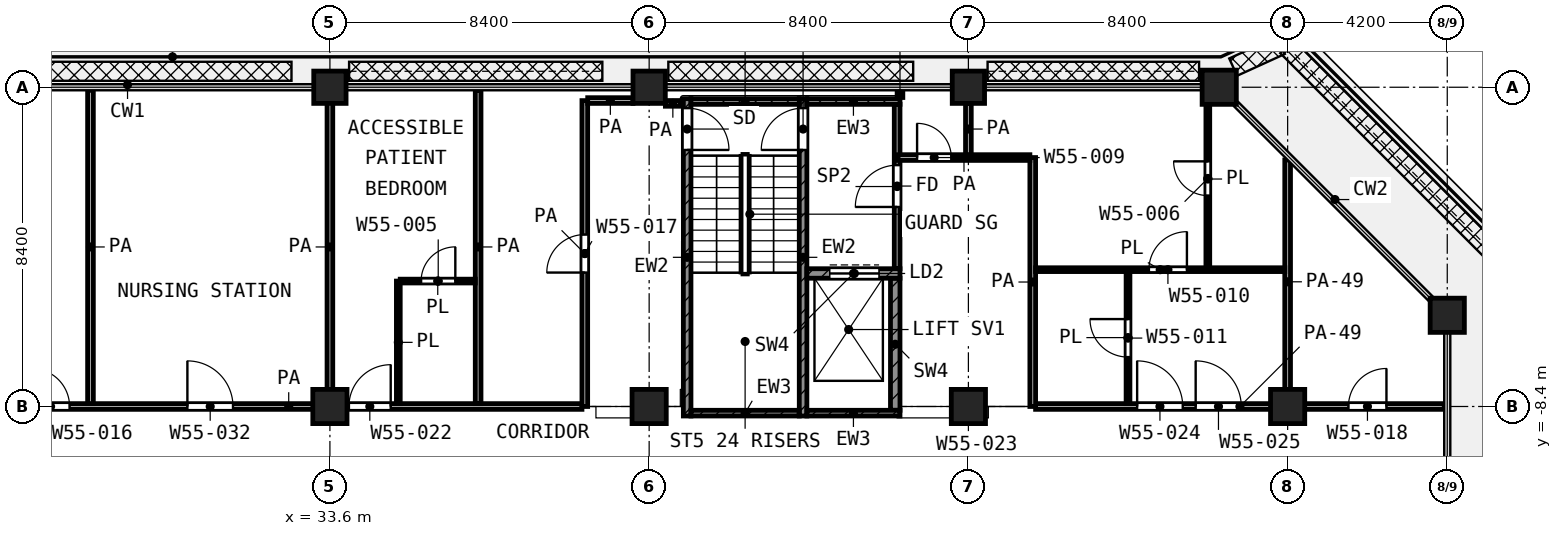
"""IFC4 building model, lengths in metres.
Left out: names, types, materials, properties, quantities, classifications, styles, units other than length and angle.
Written with IfcOpenShell. Run it as: python <this file> out.ifc"""

import sys

from ifc_helpers import new_model, si_unit, direction, frame, frame_2d, origin, origin_2d, place, context, subcontext, project, spatial, rectangle, extrude, element, fill, save


model = new_model("IFC4")
c1 = context("Model", 3, precision=1e-05, world=origin(), true_north=direction((0.0, 1.0)))
c2 = subcontext(c1, "Body", "Model", "MODEL_VIEW")
j1 = project(units=[si_unit("LENGTHUNIT", "METRE"), si_unit("PLANEANGLEUNIT", "RADIAN")], contexts=[c1])
p1 = place(None, origin())
s1 = spatial("IfcSite", under=j1, at=p1, CompositionType="ELEMENT")
p2 = place(p1, origin())
s2 = spatial("IfcBuilding", under=s1, at=p2, CompositionType="ELEMENT")
p3 = place(p2, frame((0.0, 0.0, 260.0)))
s3 = spatial("IfcBuildingStorey", under=s2, at=p3, CompositionType="ELEMENT", Elevation=260.0)
for number, where, z_axis, x_axis in (
    (1, (33.6, 0.0, 0.0), (0.0, 0.0, 1.0), (1.0, 0.0, 0.0)),
    (2, (42.0, 0.0, 0.0), (0.0, 0.0, 1.0), (1.0, 0.0, 0.0)),
    (3, (50.4, 0.0, 0.0), (0.0, 0.0, 1.0), (1.0, 0.0, 0.0)),
):
    element("IfcColumn", number, at=place(p3, frame(where, z_axis=z_axis, x_axis=x_axis)), inside=s3, PredefinedType="COLUMN", context=c2, shape_type="SweptSolid", body=[
        extrude(rectangle(XDim=0.85, YDim=0.85, at=origin_2d()), origin(), (0.0, 0.0, 1.0), 4.2),
    ])
for number, where, z_axis, x_axis in (
    (4, (57.0, 0.0, 0.0), (0.0, 0.0, 1.0), (1.0, 0.0, 0.0)),
    (5, (63.0, -6.0, 0.0), (0.0, 0.0, 1.0), (1.0, 0.0, 0.0)),
    (6, (33.6, -8.4, 0.0), (0.0, 0.0, 1.0), (1.0, 0.0, 0.0)),
    (7, (42.0, -8.4, 0.0), (0.0, 0.0, 1.0), (1.0, 0.0, 0.0)),
    (8, (50.4, -8.4, 0.0), (0.0, 0.0, 1.0), (1.0, 0.0, 0.0)),
    (9, (58.8, -8.4, 0.0), (0.0, 0.0, 1.0), (1.0, 0.0, 0.0)),
):
    element("IfcColumn", number, at=place(p3, frame(where, z_axis=z_axis, x_axis=x_axis)), inside=s3, PredefinedType="COLUMN", context=c2, shape_type="SweptSolid", body=[
        extrude(rectangle(XDim=0.9, YDim=0.9, at=origin_2d()), origin(), (0.0, 0.0, 1.0), 4.2),
    ])
p4 = place(p3, frame((43.0, -8.65, 0.0), z_axis=(0.0, 0.0, 1.0), x_axis=(0.0, 1.0, 0.0)))
e10 = element("IfcWall", 10, at=p4, inside=s3, PredefinedType="SHEAR", context=c2, shape_type="SweptSolid", body=[
    extrude(rectangle(XDim=8.35, YDim=0.2, at=frame_2d((4.175, 0.0))), origin(), (0.0, 0.0, 1.0), 3.6),
])
p5 = place(p4, frame((7.0, 0.0, 0.0)))
e11 = element("IfcOpeningElement", 11, at=p5, cuts=e10, PredefinedType="OPENING", context=c2, shape_type="SweptSolid", body=[
    extrude(rectangle(XDim=1.1, YDim=2.1, at=frame_2d((0.55, 1.05))), frame((0.0, 0.11, 0.0), z_axis=(0.0, -1.0, 0.0), x_axis=(1.0, 0.0, 0.0)), (0.0, 0.0, 1.0), 0.22),
])
p6 = place(p3, frame((46.05, -8.65, 0.0), z_axis=(0.0, 0.0, 1.0), x_axis=(0.0, 1.0, 0.0)))
e12 = element("IfcWall", 12, at=p6, inside=s3, PredefinedType="SHEAR", context=c2, shape_type="SweptSolid", body=[
    extrude(rectangle(XDim=8.35, YDim=0.2, at=frame_2d((4.175, 0.0))), origin(), (0.0, 0.0, 1.0), 3.6),
])
p7 = place(p6, frame((7.0, 0.0, 0.0)))
e13 = element("IfcOpeningElement", 13, at=p7, cuts=e12, PredefinedType="OPENING", context=c2, shape_type="SweptSolid", body=[
    extrude(rectangle(XDim=1.1, YDim=2.1, at=frame_2d((0.55, 1.05))), frame((0.0, 0.11, 0.0), z_axis=(0.0, -1.0, 0.0), x_axis=(1.0, 0.0, 0.0)), (0.0, 0.0, 1.0), 0.22),
])
p8 = place(p3, frame((43.1, -0.375, 0.0), z_axis=(0.0, 0.0, 1.0), x_axis=(1.0, 0.0, 0.0)))
e14 = element("IfcWall", 14, at=p8, inside=s3, PredefinedType="SHEAR", context=c2, shape_type="SweptSolid", body=[
    extrude(rectangle(XDim=2.85, YDim=0.15, at=frame_2d((1.425, 0.0))), origin(), (0.0, 0.0, 1.0), 3.6),
])
p9 = place(p3, frame((46.15, -0.375, 0.0), z_axis=(0.0, 0.0, 1.0), x_axis=(1.0, 0.0, 0.0)))
e15 = element("IfcWall", 15, at=p9, inside=s3, PredefinedType="SHEAR", context=c2, shape_type="SweptSolid", body=[
    extrude(rectangle(XDim=2.45, YDim=0.15, at=frame_2d((1.225, 0.0))), origin(), (0.0, 0.0, 1.0), 3.6),
])
p10 = place(p3, frame((43.1, -8.575, 0.0), z_axis=(0.0, 0.0, 1.0), x_axis=(1.0, 0.0, 0.0)))
e16 = element("IfcWall", 16, at=p10, inside=s3, PredefinedType="SHEAR", context=c2, shape_type="SweptSolid", body=[
    extrude(rectangle(XDim=2.85, YDim=0.15, at=frame_2d((1.425, 0.0))), origin(), (0.0, 0.0, 1.0), 3.6),
])
p11 = place(p3, frame((46.15, -8.575, 0.0), z_axis=(0.0, 0.0, 1.0), x_axis=(1.0, 0.0, 0.0)))
e17 = element("IfcWall", 17, at=p11, inside=s3, PredefinedType="SHEAR", context=c2, shape_type="SweptSolid", body=[
    extrude(rectangle(XDim=2.45, YDim=0.15, at=frame_2d((1.225, 0.0))), origin(), (0.0, 0.0, 1.0), 3.6),
])
p12 = place(p3, frame((46.15, -4.9, 0.0), z_axis=(0.0, 0.0, 1.0), x_axis=(1.0, 0.0, 0.0)))
e18 = element("IfcWall", 18, at=p12, inside=s3, PredefinedType="SHEAR", context=c2, shape_type="SweptSolid", body=[
    extrude(rectangle(XDim=2.45, YDim=0.25, at=frame_2d((1.225, 0.0))), origin(), (0.0, 0.0, 1.0), 3.6),
])
p13 = place(p12, frame((0.6, 0.0, 0.0)))
e19 = element("IfcOpeningElement", 19, at=p13, cuts=e18, PredefinedType="OPENING", context=c2, shape_type="SweptSolid", body=[
    extrude(rectangle(XDim=1.3, YDim=2.1, at=frame_2d((0.65, 1.05))), frame((0.0, 0.135, 0.0), z_axis=(0.0, -1.0, 0.0), x_axis=(1.0, 0.0, 0.0)), (0.0, 0.0, 1.0), 0.27),
])
p14 = place(p3, frame((48.475, -8.5, 0.0), z_axis=(0.0, 0.0, 1.0), x_axis=(0.0, 1.0, 0.0)))
e20 = element("IfcWall", 20, at=p14, inside=s3, PredefinedType="SHEAR", context=c2, shape_type="SweptSolid", body=[
    extrude(rectangle(XDim=3.475, YDim=0.25, at=frame_2d((1.738, 0.0))), origin(), (0.0, 0.0, 1.0), 3.6),
])
p15 = place(p3, frame((48.525, -4.775, 0.0), z_axis=(0.0, 0.0, 1.0), x_axis=(0.0, 1.0, 0.0)))
e21 = element("IfcWall", 21, at=p15, inside=s3, PredefinedType="PARTITIONING", context=c2, shape_type="SweptSolid", body=[
    extrude(rectangle(XDim=4.325, YDim=0.15, at=frame_2d((2.163, 0.0))), origin(), (0.0, 0.0, 1.0), 3.6),
])
p16 = place(p15, frame((1.625, 0.0, 0.0)))
e22 = element("IfcOpeningElement", 22, at=p16, cuts=e21, PredefinedType="OPENING", context=c2, shape_type="SweptSolid", body=[
    extrude(rectangle(XDim=1.1, YDim=2.1, at=frame_2d((0.55, 1.05))), frame((0.0, 0.085, 0.0), z_axis=(0.0, -1.0, 0.0), x_axis=(1.0, 0.0, 0.0)), (0.0, 0.0, 1.0), 0.17),
])
p17 = place(p3, frame((35.45, -5.1, 0.0), z_axis=(0.0, 0.0, 1.0), x_axis=(1.0, 0.0, 0.0)))
e23 = element("IfcWall", 23, at=p17, inside=s3, PredefinedType="PARTITIONING", context=c2, shape_type="SweptSolid", body=[
    extrude(rectangle(XDim=1.975, YDim=0.1, at=frame_2d((0.988, 0.0))), origin(), (0.0, 0.0, 1.0), 3.6),
])
p18 = place(p17, frame((0.55, 0.0, 0.0)))
e24 = element("IfcOpeningElement", 24, at=p18, cuts=e23, PredefinedType="OPENING", context=c2, shape_type="SweptSolid", body=[
    extrude(rectangle(XDim=0.9, YDim=2.1, at=frame_2d((0.45, 1.05))), frame((0.0, 0.06, 0.0), z_axis=(0.0, -1.0, 0.0), x_axis=(1.0, 0.0, 0.0)), (0.0, 0.0, 1.0), 0.12),
])
p19 = place(p3, frame((52.168, -4.8, 0.0), z_axis=(0.0, 0.0, 1.0), x_axis=(1.0, 0.0, 0.0)))
e25 = element("IfcWall", 25, at=p19, inside=s3, PredefinedType="PARTITIONING", context=c2, shape_type="SweptSolid", body=[
    extrude(rectangle(XDim=6.557, YDim=0.1, at=frame_2d((3.279, 0.0))), origin(), (0.0, 0.0, 1.0), 3.6),
])
p20 = place(p19, frame((2.982, 0.0, 0.0)))
e26 = element("IfcOpeningElement", 26, at=p20, cuts=e25, PredefinedType="OPENING", context=c2, shape_type="SweptSolid", body=[
    extrude(rectangle(XDim=1.0, YDim=2.1, at=frame_2d((0.5, 1.05))), frame((0.0, 0.06, 0.0), z_axis=(0.0, -1.0, 0.0), x_axis=(1.0, 0.0, 0.0)), (0.0, 0.0, 1.0), 0.12),
])
p21 = place(p3, frame((35.4, -8.325, 0.0), z_axis=(0.0, 0.0, 1.0), x_axis=(0.0, 1.0, 0.0)))
e27 = element("IfcWall", 27, at=p21, inside=s3, PredefinedType="PARTITIONING", context=c2, shape_type="SweptSolid", body=[
    extrude(rectangle(XDim=3.225, YDim=0.1, at=frame_2d((1.612, 0.0))), origin(), (0.0, 0.0, 1.0), 3.6),
])
p22 = place(p3, frame((54.6, -8.325, 0.0), z_axis=(0.0, 0.0, 1.0), x_axis=(0.0, 1.0, 0.0)))
e28 = element("IfcWall", 28, at=p22, inside=s3, PredefinedType="PARTITIONING", context=c2, shape_type="SweptSolid", body=[
    extrude(rectangle(XDim=3.475, YDim=0.1, at=frame_2d((1.737, 0.0))), origin(), (0.0, 0.0, 1.0), 3.6),
])
p23 = place(p22, frame((1.225, 0.0, 0.0)))
e29 = element("IfcOpeningElement", 29, at=p23, cuts=e28, PredefinedType="OPENING", context=c2, shape_type="SweptSolid", body=[
    extrude(rectangle(XDim=1.0, YDim=2.1, at=frame_2d((0.5, 1.05))), frame((0.0, 0.06, 0.0), z_axis=(0.0, -1.0, 0.0), x_axis=(1.0, 0.0, 0.0)), (0.0, 0.0, 1.0), 0.12),
])
p24 = place(p3, frame((56.7, -4.75, 0.0), z_axis=(0.0, 0.0, 1.0), x_axis=(0.0, 1.0, 0.0)))
e30 = element("IfcWall", 30, at=p24, inside=s3, PredefinedType="PARTITIONING", context=c2, shape_type="SweptSolid", body=[
    extrude(rectangle(XDim=4.67, YDim=0.1, at=frame_2d((2.335, 0.0))), origin(), (0.0, 0.0, 1.0), 3.6),
])
p25 = place(p24, frame((1.9, 0.0, 0.0)))
e31 = element("IfcOpeningElement", 31, at=p25, cuts=e30, PredefinedType="OPENING", context=c2, shape_type="SweptSolid", body=[
    extrude(rectangle(XDim=0.9, YDim=2.1, at=frame_2d((0.45, 1.05))), frame((0.0, 0.06, 0.0), z_axis=(0.0, -1.0, 0.0), x_axis=(1.0, 0.0, 0.0)), (0.0, 0.0, 1.0), 0.12),
])
p26 = place(p3, frame((24.8, -8.4, 0.0), z_axis=(0.0, 0.0, 1.0), x_axis=(1.0, 0.0, 0.0)))
e32 = element("IfcWall", 32, at=p26, inside=s3, PredefinedType="PARTITIONING", context=c2, shape_type="SweptSolid", body=[
    extrude(rectangle(XDim=15.432, YDim=0.15, at=frame_2d((7.716, 0.0))), origin(), (0.0, 0.0, 1.0), 3.6),
])
p27 = place(p26, frame((9.3, 0.0, 0.0)))
e33 = element("IfcOpeningElement", 33, at=p27, cuts=e32, PredefinedType="OPENING", context=c2, shape_type="SweptSolid", body=[
    extrude(rectangle(XDim=1.1, YDim=2.1, at=frame_2d((0.55, 1.05))), frame((0.0, 0.085, 0.0), z_axis=(0.0, -1.0, 0.0), x_axis=(1.0, 0.0, 0.0)), (0.0, 0.0, 1.0), 0.17),
])
p28 = place(p26, frame((0.95, 0.0, 0.0)))
e34 = element("IfcOpeningElement", 34, at=p28, cuts=e32, PredefinedType="OPENING", context=c2, shape_type="SweptSolid", body=[
    extrude(rectangle(XDim=1.0, YDim=2.1, at=frame_2d((0.5, 1.05))), frame((0.0, 0.085, 0.0), z_axis=(0.0, -1.0, 0.0), x_axis=(1.0, 0.0, 0.0)), (0.0, 0.0, 1.0), 0.17),
])
p29 = place(p26, frame((5.05, 0.0, 0.0)))
e35 = element("IfcOpeningElement", 35, at=p29, cuts=e32, PredefinedType="OPENING", context=c2, shape_type="SweptSolid", body=[
    extrude(rectangle(XDim=1.2, YDim=2.1, at=frame_2d((0.6, 1.05))), frame((0.0, 0.085, 0.0), z_axis=(0.0, -1.0, 0.0), x_axis=(1.0, 0.0, 0.0)), (0.0, 0.0, 1.0), 0.17),
])
p30 = place(p3, frame((52.168, -8.4, 0.0), z_axis=(0.0, 0.0, 1.0), x_axis=(1.0, 0.0, 0.0)))
e36 = element("IfcWall", 36, at=p30, inside=s3, PredefinedType="PARTITIONING", context=c2, shape_type="SweptSolid", body=[
    extrude(rectangle(XDim=10.752, YDim=0.15, at=frame_2d((5.376, 0.0))), origin(), (0.0, 0.0, 1.0), 2.7),
])
p31 = place(p30, frame((2.672, 0.0, 0.0)))
e37 = element("IfcOpeningElement", 37, at=p31, cuts=e36, PredefinedType="OPENING", context=c2, shape_type="SweptSolid", body=[
    extrude(rectangle(XDim=1.2, YDim=2.1, at=frame_2d((0.6, 1.05))), frame((0.0, 0.085, 0.0), z_axis=(0.0, -1.0, 0.0), x_axis=(1.0, 0.0, 0.0)), (0.0, 0.0, 1.0), 0.17),
])
p32 = place(p30, frame((4.212, 0.0, 0.0)))
e38 = element("IfcOpeningElement", 38, at=p32, cuts=e36, PredefinedType="OPENING", context=c2, shape_type="SweptSolid", body=[
    extrude(rectangle(XDim=1.2, YDim=2.1, at=frame_2d((0.6, 1.05))), frame((0.0, 0.085, 0.0), z_axis=(0.0, -1.0, 0.0), x_axis=(1.0, 0.0, 0.0)), (0.0, 0.0, 1.0), 0.17),
])
p33 = place(p30, frame((8.232, 0.0, 0.0)))
e39 = element("IfcOpeningElement", 39, at=p33, cuts=e36, PredefinedType="OPENING", context=c2, shape_type="SweptSolid", body=[
    extrude(rectangle(XDim=1.0, YDim=2.1, at=frame_2d((0.5, 1.05))), frame((0.0, 0.085, 0.0), z_axis=(0.0, -1.0, 0.0), x_axis=(1.0, 0.0, 0.0)), (0.0, 0.0, 1.0), 0.17),
])
p34 = place(p3, frame((48.55, -1.85, 0.0), z_axis=(0.0, 0.0, 1.0), x_axis=(1.0, 0.0, 0.0)))
e40 = element("IfcWall", 40, at=p34, inside=s3, PredefinedType="PARTITIONING", context=c2, shape_type="SweptSolid", body=[
    extrude(rectangle(XDim=3.468, YDim=0.15, at=frame_2d((1.734, 0.0))), origin(), (0.0, 0.0, 1.0), 3.6),
])
p35 = place(p34, frame((0.5, 0.0, 0.0)))
e41 = element("IfcOpeningElement", 41, at=p35, cuts=e40, PredefinedType="OPENING", context=c2, shape_type="SweptSolid", body=[
    extrude(rectangle(XDim=0.9, YDim=2.1, at=frame_2d((0.45, 1.05))), frame((0.0, 0.085, 0.0), z_axis=(0.0, -1.0, 0.0), x_axis=(1.0, 0.0, 0.0)), (0.0, 0.0, 1.0), 0.17),
])
p36 = place(p3, frame((42.427, -0.425, 0.0), z_axis=(0.0, 0.0, 1.0), x_axis=(1.0, 0.0, 0.0)))
e42 = element("IfcWall", 42, at=p36, inside=s3, PredefinedType="PARTITIONING", context=c2, shape_type="SweptSolid", body=[
    extrude(rectangle(XDim=0.393, YDim=0.15, at=frame_2d((0.197, 0.0))), origin(), (0.0, 0.0, 1.0), 3.6),
])
p37 = place(p3, frame((40.383, -0.35, 0.0), z_axis=(0.0, 0.0, 1.0), x_axis=(1.0, 0.0, 0.0)))
e43 = element("IfcWall", 43, at=p37, inside=s3, PredefinedType="PARTITIONING", context=c2, shape_type="SweptSolid", body=[
    extrude(rectangle(XDim=1.192, YDim=0.15, at=frame_2d((0.596, 0.0))), origin(), (0.0, 0.0, 1.0), 3.6),
])
for number, where, z_axis, x_axis in (
    (44, (27.3, -8.325, 0.0), (0.0, 0.0, 1.0), (0.0, 1.0, 0.0)),
    (45, (33.6, -8.325, 0.0), (0.0, 0.0, 1.0), (0.0, 1.0, 0.0)),
    (46, (37.5, -8.325, 0.0), (0.0, 0.0, 1.0), (0.0, 1.0, 0.0)),
):
    element("IfcWall", number, at=place(p3, frame(where, z_axis=z_axis, x_axis=x_axis)), inside=s3, PredefinedType="PARTITIONING", context=c2, shape_type="SweptSolid", body=[
        extrude(rectangle(XDim=8.245, YDim=0.15, at=frame_2d((4.123, 0.0))), origin(), (0.0, 0.0, 1.0), 3.6),
    ])
p38 = place(p3, frame((40.307, -8.4, 0.0), z_axis=(0.0, 0.0, 1.0), x_axis=(0.0, 1.0, 0.0)))
e47 = element("IfcWall", 47, at=p38, inside=s3, PredefinedType="PARTITIONING", context=c2, shape_type="SweptSolid", body=[
    extrude(rectangle(XDim=8.048, YDim=0.15, at=frame_2d((4.024, 0.0))), origin(), (0.0, 0.0, 1.0), 3.6),
])
p39 = place(p38, frame((3.524, 0.0, 0.0)))
e48 = element("IfcOpeningElement", 48, at=p39, cuts=e47, PredefinedType="OPENING", context=c2, shape_type="SweptSolid", body=[
    extrude(rectangle(XDim=1.0, YDim=2.1, at=frame_2d((0.5, 1.05))), frame((0.0, 0.085, 0.0), z_axis=(0.0, -1.0, 0.0), x_axis=(1.0, 0.0, 0.0)), (0.0, 0.0, 1.0), 0.17),
])
p40 = place(p3, frame((48.6, -0.27, 0.0), z_axis=(0.0, 0.0, 1.0), x_axis=(0.0, 1.0, 0.0)))
e49 = element("IfcWall", 49, at=p40, inside=s3, PredefinedType="PARTITIONING", context=c2, shape_type="SweptSolid", body=[
    extrude(rectangle(XDim=0.19, YDim=0.15, at=frame_2d((0.095, 0.0))), origin(), (0.0, 0.0, 1.0), 3.6),
])
p41 = place(p3, frame((50.4, -1.775, 0.0), z_axis=(0.0, 0.0, 1.0), x_axis=(0.0, 1.0, 0.0)))
e50 = element("IfcWall", 50, at=p41, inside=s3, PredefinedType="PARTITIONING", context=c2, shape_type="SweptSolid", body=[
    extrude(rectangle(XDim=1.35, YDim=0.15, at=frame_2d((0.675, 0.0))), origin(), (0.0, 0.0, 1.0), 3.6),
])
p42 = place(p3, frame((52.093, -8.4, 0.0), z_axis=(0.0, 0.0, 1.0), x_axis=(0.0, 1.0, 0.0)))
e51 = element("IfcWall", 51, at=p42, inside=s3, PredefinedType="PARTITIONING", context=c2, shape_type="SweptSolid", body=[
    extrude(rectangle(XDim=6.55, YDim=0.15, at=frame_2d((3.275, 0.0))), origin(), (0.0, 0.0, 1.0), 3.6),
])
p43 = place(p3, frame((58.8, -8.325, 0.0), z_axis=(0.0, 0.0, 1.0), x_axis=(0.0, 1.0, 0.0)))
e52 = element("IfcWall", 52, at=p43, inside=s3, PredefinedType="PARTITIONING", context=c2, shape_type="SweptSolid", body=[
    extrude(rectangle(XDim=6.412, YDim=0.15, at=frame_2d((3.206, 0.0))), origin(), (0.0, 0.0, 1.0), 2.7),
])
p44 = place(p5, frame((1.1, 0.0, 0.0), z_axis=(0.0, 0.0, 1.0), x_axis=(-1.0, 0.0, 0.0)))
e53 = element("IfcDoor", 53, at=p44, inside=s3, OperationType="SINGLE_SWING_LEFT", PredefinedType="DOOR", context=c2, shape_type="SweptSolid", body=[
    extrude(rectangle(XDim=1.1, YDim=2.1, at=frame_2d((0.55, 1.05))), frame((0.0, 0.025, 0.0), z_axis=(0.0, -1.0, 0.0), x_axis=(1.0, 0.0, 0.0)), (0.0, 0.0, 1.0), 0.05),
])
fill(e11, e53)
p45 = place(p7, origin())
e54 = element("IfcDoor", 54, at=p45, inside=s3, OperationType="SINGLE_SWING_LEFT", PredefinedType="DOOR", context=c2, shape_type="SweptSolid", body=[
    extrude(rectangle(XDim=1.1, YDim=2.1, at=frame_2d((0.55, 1.05))), frame((0.0, 0.025, 0.0), z_axis=(0.0, -1.0, 0.0), x_axis=(1.0, 0.0, 0.0)), (0.0, 0.0, 1.0), 0.05),
])
fill(e13, e54)
p46 = place(p13, origin())
e55 = element("IfcDoor", 55, at=p46, inside=s3, OperationType="DOUBLE_DOOR_SLIDING", PredefinedType="DOOR", context=c2, shape_type="SweptSolid", body=[
    extrude(rectangle(XDim=1.3, YDim=2.1, at=frame_2d((0.65, 1.05))), frame((0.0, 0.025, 0.0), z_axis=(0.0, -1.0, 0.0), x_axis=(1.0, 0.0, 0.0)), (0.0, 0.0, 1.0), 0.05),
])
fill(e19, e55)
p47 = place(p16, origin())
e56 = element("IfcDoor", 56, at=p47, inside=s3, OperationType="SINGLE_SWING_LEFT", PredefinedType="DOOR", context=c2, shape_type="SweptSolid", body=[
    extrude(rectangle(XDim=1.1, YDim=2.1, at=frame_2d((0.55, 1.05))), frame((0.0, 0.025, 0.0), z_axis=(0.0, -1.0, 0.0), x_axis=(1.0, 0.0, 0.0)), (0.0, 0.0, 1.0), 0.05),
])
fill(e22, e56)
p48 = place(p27, origin())
e57 = element("IfcDoor", 57, at=p48, inside=s3, OperationType="SINGLE_SWING_RIGHT", PredefinedType="DOOR", context=c2, shape_type="SweptSolid", body=[
    extrude(rectangle(XDim=1.1, YDim=2.1, at=frame_2d((0.55, 1.05))), frame((0.0, 0.025, 0.0), z_axis=(0.0, -1.0, 0.0), x_axis=(1.0, 0.0, 0.0)), (0.0, 0.0, 1.0), 0.05),
])
fill(e33, e57)
p49 = place(p18, origin())
e58 = element("IfcDoor", 58, at=p49, inside=s3, OperationType="SINGLE_SWING_RIGHT", PredefinedType="DOOR", context=c2, shape_type="SweptSolid", body=[
    extrude(rectangle(XDim=0.9, YDim=2.1, at=frame_2d((0.45, 1.05))), frame((0.0, 0.025, 0.0), z_axis=(0.0, -1.0, 0.0), x_axis=(1.0, 0.0, 0.0)), (0.0, 0.0, 1.0), 0.05),
])
fill(e24, e58)
p50 = place(p39, origin())
e59 = element("IfcDoor", 59, at=p50, inside=s3, OperationType="SINGLE_SWING_LEFT", PredefinedType="DOOR", context=c2, shape_type="SweptSolid", body=[
    extrude(rectangle(XDim=1.0, YDim=2.1, at=frame_2d((0.5, 1.05))), frame((0.0, 0.025, 0.0), z_axis=(0.0, -1.0, 0.0), x_axis=(1.0, 0.0, 0.0)), (0.0, 0.0, 1.0), 0.05),
])
fill(e48, e59)
p51 = place(p31, origin())
e60 = element("IfcDoor", 60, at=p51, inside=s3, OperationType="SINGLE_SWING_LEFT", PredefinedType="DOOR", context=c2, shape_type="SweptSolid", body=[
    extrude(rectangle(XDim=1.2, YDim=2.1, at=frame_2d((0.6, 1.05))), frame((0.0, 0.025, 0.0), z_axis=(0.0, -1.0, 0.0), x_axis=(1.0, 0.0, 0.0)), (0.0, 0.0, 1.0), 0.05),
])
fill(e37, e60)
p52 = place(p32, origin())
e61 = element("IfcDoor", 61, at=p52, inside=s3, OperationType="SINGLE_SWING_LEFT", PredefinedType="DOOR", context=c2, shape_type="SweptSolid", body=[
    extrude(rectangle(XDim=1.2, YDim=2.1, at=frame_2d((0.6, 1.05))), frame((0.0, 0.025, 0.0), z_axis=(0.0, -1.0, 0.0), x_axis=(1.0, 0.0, 0.0)), (0.0, 0.0, 1.0), 0.05),
])
fill(e38, e61)
p53 = place(p20, origin())
e62 = element("IfcDoor", 62, at=p53, inside=s3, OperationType="SINGLE_SWING_RIGHT", PredefinedType="DOOR", context=c2, shape_type="SweptSolid", body=[
    extrude(rectangle(XDim=1.0, YDim=2.1, at=frame_2d((0.5, 1.05))), frame((0.0, 0.025, 0.0), z_axis=(0.0, -1.0, 0.0), x_axis=(1.0, 0.0, 0.0)), (0.0, 0.0, 1.0), 0.05),
])
fill(e26, e62)
p54 = place(p23, origin())
e63 = element("IfcDoor", 63, at=p54, inside=s3, OperationType="SINGLE_SWING_RIGHT", PredefinedType="DOOR", context=c2, shape_type="SweptSolid", body=[
    extrude(rectangle(XDim=1.0, YDim=2.1, at=frame_2d((0.5, 1.05))), frame((0.0, 0.025, 0.0), z_axis=(0.0, -1.0, 0.0), x_axis=(1.0, 0.0, 0.0)), (0.0, 0.0, 1.0), 0.05),
])
fill(e29, e63)
p55 = place(p25, origin())
e64 = element("IfcDoor", 64, at=p55, inside=s3, OperationType="SINGLE_SWING_RIGHT", PredefinedType="DOOR", context=c2, shape_type="SweptSolid", body=[
    extrude(rectangle(XDim=0.9, YDim=2.1, at=frame_2d((0.45, 1.05))), frame((0.0, 0.025, 0.0), z_axis=(0.0, -1.0, 0.0), x_axis=(1.0, 0.0, 0.0)), (0.0, 0.0, 1.0), 0.05),
])
fill(e31, e64)
p56 = place(p33, origin())
e65 = element("IfcDoor", 65, at=p56, inside=s3, OperationType="SINGLE_SWING_RIGHT", PredefinedType="DOOR", context=c2, shape_type="SweptSolid", body=[
    extrude(rectangle(XDim=1.0, YDim=2.1, at=frame_2d((0.5, 1.05))), frame((0.0, 0.025, 0.0), z_axis=(0.0, -1.0, 0.0), x_axis=(1.0, 0.0, 0.0)), (0.0, 0.0, 1.0), 0.05),
])
fill(e39, e65)
p57 = place(p35, origin())
e66 = element("IfcDoor", 66, at=p57, inside=s3, OperationType="SINGLE_SWING_LEFT", PredefinedType="DOOR", context=c2, shape_type="SweptSolid", body=[
    extrude(rectangle(XDim=0.9, YDim=2.1, at=frame_2d((0.45, 1.05))), frame((0.0, 0.025, 0.0), z_axis=(0.0, -1.0, 0.0), x_axis=(1.0, 0.0, 0.0)), (0.0, 0.0, 1.0), 0.05),
])
fill(e41, e66)
p58 = place(p28, origin())
e67 = element("IfcDoor", 67, at=p58, inside=s3, OperationType="SINGLE_SWING_LEFT", PredefinedType="DOOR", context=c2, shape_type="SweptSolid", body=[
    extrude(rectangle(XDim=1.0, YDim=2.1, at=frame_2d((0.5, 1.05))), frame((0.0, 0.025, 0.0), z_axis=(0.0, -1.0, 0.0), x_axis=(1.0, 0.0, 0.0)), (0.0, 0.0, 1.0), 0.05),
])
fill(e34, e67)
p59 = place(p29, origin())
e68 = element("IfcDoor", 68, at=p59, inside=s3, OperationType="SINGLE_SWING_LEFT", PredefinedType="DOOR", context=c2, shape_type="SweptSolid", body=[
    extrude(rectangle(XDim=1.2, YDim=2.1, at=frame_2d((0.6, 1.05))), frame((0.0, 0.025, 0.0), z_axis=(0.0, -1.0, 0.0), x_axis=(1.0, 0.0, 0.0)), (0.0, 0.0, 1.0), 0.05),
])
fill(e35, e68)
save(model, sys.argv[1])
